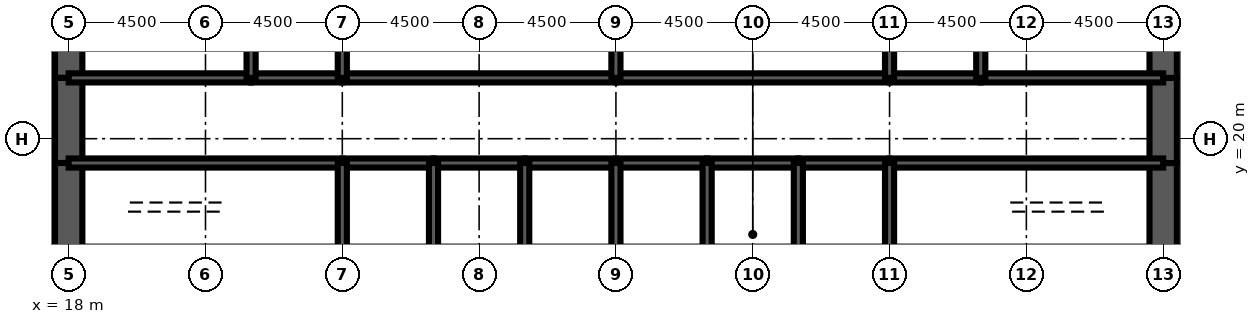
"""IFC4 building model, lengths in metres.
Left out: names, types, materials, properties, quantities, classifications, styles, units other than length and angle.
Written with IfcOpenShell. Run it as: python <this file> out.ifc"""

import sys

from ifc_helpers import new_model, si_unit, direction, frame, frame_2d, origin, place, context, subcontext, project, spatial, rectangle, extrude, element, fill, save


model = new_model("IFC4")
c1 = context("Model", 3, precision=1e-05, world=origin(), true_north=direction((0.0, 1.0)))
c2 = subcontext(c1, "Body", "Model", "MODEL_VIEW")
j1 = project(units=[si_unit("LENGTHUNIT", "METRE"), si_unit("PLANEANGLEUNIT", "RADIAN")], contexts=[c1])
p1 = place(None, origin())
s1 = spatial("IfcSite", under=j1, at=p1, CompositionType="ELEMENT")
p2 = place(p1, origin())
s2 = spatial("IfcBuilding", under=s1, at=p2, CompositionType="ELEMENT")
p3 = place(p2, frame((0.0, 0.0, 159.3)))
s3 = spatial("IfcBuildingStorey", under=s2, at=p3, CompositionType="ELEMENT", Elevation=159.3)
p4 = place(p3, frame((18.0, 26.0, 0.0), z_axis=(0.0, 0.0, 1.0), x_axis=(0.0, -1.0, 0.0)))
e1 = element("IfcWall", 1, at=p4, inside=s3, PredefinedType="SHEAR", context=c2, shape_type="SweptSolid", body=[
    extrude(rectangle(XDim=4.0, YDim=0.9, at=frame_2d((2.0, 0.0))), origin(), (0.0, 0.0, 1.0), 4.2),
])
p5 = place(p3, frame((18.0, 22.0, 0.0), z_axis=(0.0, 0.0, 1.0), x_axis=(0.0, -1.0, 0.0)))
e2 = element("IfcWall", 2, at=p5, inside=s3, PredefinedType="SHEAR", context=c2, shape_type="SweptSolid", body=[
    extrude(rectangle(XDim=2.8, YDim=0.9, at=frame_2d((1.4, 0.0))), origin(), (0.0, 0.0, 1.0), 4.2),
])
p6 = place(p5, frame((0.6, 0.0, 0.0)))
e3 = element("IfcOpeningElement", 3, at=p6, cuts=e2, PredefinedType="OPENING", context=c2, shape_type="SweptSolid", body=[
    extrude(rectangle(XDim=1.8, YDim=2.1, at=frame_2d((0.9, 1.05))), frame((0.0, 0.46, 0.0), z_axis=(0.0, -1.0, 0.0), x_axis=(1.0, 0.0, 0.0)), (0.0, 0.0, 1.0), 0.92),
])
for number, where, z_axis, x_axis in (
    (4, (18.0, 19.2, 0.0), (0.0, 0.0, 1.0), (0.0, -1.0, 0.0)),
    (5, (54.0, 16.0, 0.0), (0.0, 0.0, 1.0), (0.0, 1.0, 0.0)),
):
    element("IfcWall", number, at=place(p3, frame(where, z_axis=z_axis, x_axis=x_axis)), inside=s3, PredefinedType="SHEAR", context=c2, shape_type="SweptSolid", body=[
        extrude(rectangle(XDim=3.2, YDim=0.9, at=frame_2d((1.6, 0.0))), origin(), (0.0, 0.0, 1.0), 4.2),
    ])
p7 = place(p3, frame((54.0, 19.2, 0.0), z_axis=(0.0, 0.0, 1.0), x_axis=(0.0, 1.0, 0.0)))
e6 = element("IfcWall", 6, at=p7, inside=s3, PredefinedType="SHEAR", context=c2, shape_type="SweptSolid", body=[
    extrude(rectangle(XDim=2.8, YDim=0.9, at=frame_2d((1.4, 0.0))), origin(), (0.0, 0.0, 1.0), 4.2),
])
p8 = place(p7, frame((0.4, 0.0, 0.0)))
e7 = element("IfcOpeningElement", 7, at=p8, cuts=e6, PredefinedType="OPENING", context=c2, shape_type="SweptSolid", body=[
    extrude(rectangle(XDim=1.8, YDim=2.1, at=frame_2d((0.9, 1.05))), frame((0.0, 0.46, 0.0), z_axis=(0.0, -1.0, 0.0), x_axis=(1.0, 0.0, 0.0)), (0.0, 0.0, 1.0), 0.92),
])
p9 = place(p3, frame((54.0, 22.0, 0.0), z_axis=(0.0, 0.0, 1.0), x_axis=(0.0, 1.0, 0.0)))
e8 = element("IfcWall", 8, at=p9, inside=s3, PredefinedType="SHEAR", context=c2, shape_type="SweptSolid", body=[
    extrude(rectangle(XDim=4.0, YDim=0.9, at=frame_2d((2.0, 0.0))), origin(), (0.0, 0.0, 1.0), 4.2),
])
p10 = place(p3, frame((18.0, 19.2, 0.0), z_axis=(0.0, 0.0, 1.0), x_axis=(1.0, 0.0, 0.0)))
e9 = element("IfcWall", 9, at=p10, inside=s3, PredefinedType="SOLIDWALL", context=c2, shape_type="SweptSolid", body=[
    extrude(rectangle(XDim=9.0, YDim=0.3, at=frame_2d((4.5, 0.0))), origin(), (0.0, 0.0, 1.0), 4.2),
])
p11 = place(p10, frame((0.65, 0.0, 0.0)))
e10 = element("IfcOpeningElement", 10, at=p11, cuts=e9, PredefinedType="OPENING", context=c2, shape_type="SweptSolid", body=[
    extrude(rectangle(XDim=1.0, YDim=2.1, at=frame_2d((0.5, 1.05))), frame((0.0, 0.16, 0.0), z_axis=(0.0, -1.0, 0.0), x_axis=(1.0, 0.0, 0.0)), (0.0, 0.0, 1.0), 0.32),
])
p12 = place(p3, frame((27.0, 19.2, 0.0), z_axis=(0.0, 0.0, 1.0), x_axis=(1.0, 0.0, 0.0)))
e11 = element("IfcWall", 11, at=p12, inside=s3, PredefinedType="SOLIDWALL", context=c2, shape_type="SweptSolid", body=[
    extrude(rectangle(XDim=3.0, YDim=0.3, at=frame_2d((1.5, 0.0))), origin(), (0.0, 0.0, 1.0), 4.2),
])
p13 = place(p12, frame((0.95, 0.0, 0.0)))
e12 = element("IfcOpeningElement", 12, at=p13, cuts=e11, PredefinedType="OPENING", context=c2, shape_type="SweptSolid", body=[
    extrude(rectangle(XDim=1.1, YDim=2.2, at=frame_2d((0.55, 1.1))), frame((0.0, 0.16, 0.0), z_axis=(0.0, -1.0, 0.0), x_axis=(1.0, 0.0, 0.0)), (0.0, 0.0, 1.0), 0.32),
])
p14 = place(p3, frame((30.0, 19.2, 0.0), z_axis=(0.0, 0.0, 1.0), x_axis=(1.0, 0.0, 0.0)))
e13 = element("IfcWall", 13, at=p14, inside=s3, PredefinedType="SOLIDWALL", context=c2, shape_type="SweptSolid", body=[
    extrude(rectangle(XDim=3.0, YDim=0.3, at=frame_2d((1.5, 0.0))), origin(), (0.0, 0.0, 1.0), 4.2),
])
p15 = place(p14, frame((0.95, 0.0, 0.0)))
e14 = element("IfcOpeningElement", 14, at=p15, cuts=e13, PredefinedType="OPENING", context=c2, shape_type="SweptSolid", body=[
    extrude(rectangle(XDim=1.1, YDim=2.2, at=frame_2d((0.55, 1.1))), frame((0.0, 0.16, 0.0), z_axis=(0.0, -1.0, 0.0), x_axis=(1.0, 0.0, 0.0)), (0.0, 0.0, 1.0), 0.32),
])
p16 = place(p3, frame((33.0, 19.2, 0.0), z_axis=(0.0, 0.0, 1.0), x_axis=(1.0, 0.0, 0.0)))
e15 = element("IfcWall", 15, at=p16, inside=s3, PredefinedType="SOLIDWALL", context=c2, shape_type="SweptSolid", body=[
    extrude(rectangle(XDim=3.0, YDim=0.3, at=frame_2d((1.5, 0.0))), origin(), (0.0, 0.0, 1.0), 4.2),
])
p17 = place(p16, frame((0.95, 0.0, 0.0)))
e16 = element("IfcOpeningElement", 16, at=p17, cuts=e15, PredefinedType="OPENING", context=c2, shape_type="SweptSolid", body=[
    extrude(rectangle(XDim=1.1, YDim=2.2, at=frame_2d((0.55, 1.1))), frame((0.0, 0.16, 0.0), z_axis=(0.0, -1.0, 0.0), x_axis=(1.0, 0.0, 0.0)), (0.0, 0.0, 1.0), 0.32),
])
p18 = place(p3, frame((36.0, 19.2, 0.0), z_axis=(0.0, 0.0, 1.0), x_axis=(1.0, 0.0, 0.0)))
e17 = element("IfcWall", 17, at=p18, inside=s3, PredefinedType="SOLIDWALL", context=c2, shape_type="SweptSolid", body=[
    extrude(rectangle(XDim=3.0, YDim=0.3, at=frame_2d((1.5, 0.0))), origin(), (0.0, 0.0, 1.0), 4.2),
])
p19 = place(p18, frame((0.95, 0.0, 0.0)))
e18 = element("IfcOpeningElement", 18, at=p19, cuts=e17, PredefinedType="OPENING", context=c2, shape_type="SweptSolid", body=[
    extrude(rectangle(XDim=1.1, YDim=2.2, at=frame_2d((0.55, 1.1))), frame((0.0, 0.16, 0.0), z_axis=(0.0, -1.0, 0.0), x_axis=(1.0, 0.0, 0.0)), (0.0, 0.0, 1.0), 0.32),
])
p20 = place(p3, frame((39.0, 19.2, 0.0), z_axis=(0.0, 0.0, 1.0), x_axis=(1.0, 0.0, 0.0)))
e19 = element("IfcWall", 19, at=p20, inside=s3, PredefinedType="SOLIDWALL", context=c2, shape_type="SweptSolid", body=[
    extrude(rectangle(XDim=3.0, YDim=0.3, at=frame_2d((1.5, 0.0))), origin(), (0.0, 0.0, 1.0), 4.2),
])
p21 = place(p20, frame((1.0, 0.0, 0.0)))
e20 = element("IfcOpeningElement", 20, at=p21, cuts=e19, PredefinedType="OPENING", context=c2, shape_type="SweptSolid", body=[
    extrude(rectangle(XDim=1.0, YDim=2.1, at=frame_2d((0.5, 1.05))), frame((0.0, 0.16, 0.0), z_axis=(0.0, -1.0, 0.0), x_axis=(1.0, 0.0, 0.0)), (0.0, 0.0, 1.0), 0.32),
])
p22 = place(p3, frame((42.0, 19.2, 0.0), z_axis=(0.0, 0.0, 1.0), x_axis=(1.0, 0.0, 0.0)))
e21 = element("IfcWall", 21, at=p22, inside=s3, PredefinedType="SOLIDWALL", context=c2, shape_type="SweptSolid", body=[
    extrude(rectangle(XDim=3.0, YDim=0.3, at=frame_2d((1.5, 0.0))), origin(), (0.0, 0.0, 1.0), 4.2),
])
p23 = place(p3, frame((45.0, 19.2, 0.0), z_axis=(0.0, 0.0, 1.0), x_axis=(1.0, 0.0, 0.0)))
e22 = element("IfcWall", 22, at=p23, inside=s3, PredefinedType="SOLIDWALL", context=c2, shape_type="SweptSolid", body=[
    extrude(rectangle(XDim=9.0, YDim=0.3, at=frame_2d((4.5, 0.0))), origin(), (0.0, 0.0, 1.0), 4.2),
])
p24 = place(p23, frame((7.35, 0.0, 0.0)))
e23 = element("IfcOpeningElement", 23, at=p24, cuts=e22, PredefinedType="OPENING", context=c2, shape_type="SweptSolid", body=[
    extrude(rectangle(XDim=1.0, YDim=2.1, at=frame_2d((0.5, 1.05))), frame((0.0, 0.16, 0.0), z_axis=(0.0, -1.0, 0.0), x_axis=(1.0, 0.0, 0.0)), (0.0, 0.0, 1.0), 0.32),
])
p25 = place(p3, frame((18.0, 22.0, 0.0), z_axis=(0.0, 0.0, 1.0), x_axis=(1.0, 0.0, 0.0)))
e24 = element("IfcWall", 24, at=p25, inside=s3, PredefinedType="SOLIDWALL", context=c2, shape_type="SweptSolid", body=[
    extrude(rectangle(XDim=6.0, YDim=0.3, at=frame_2d((3.0, 0.0))), origin(), (0.0, 0.0, 1.0), 4.2),
])
p26 = place(p25, frame((4.4, 0.0, 0.0)))
e25 = element("IfcOpeningElement", 25, at=p26, cuts=e24, PredefinedType="OPENING", context=c2, shape_type="SweptSolid", body=[
    extrude(rectangle(XDim=1.0, YDim=2.1, at=frame_2d((0.5, 1.05))), frame((0.0, 0.16, 0.0), z_axis=(0.0, -1.0, 0.0), x_axis=(1.0, 0.0, 0.0)), (0.0, 0.0, 1.0), 0.32),
])
p27 = place(p25, frame((0.7, 0.0, 0.0)))
e26 = element("IfcOpeningElement", 26, at=p27, cuts=e24, PredefinedType="OPENING", context=c2, shape_type="SweptSolid", body=[
    extrude(rectangle(XDim=1.0, YDim=2.1, at=frame_2d((0.5, 1.05))), frame((0.0, 0.16, 0.0), z_axis=(0.0, -1.0, 0.0), x_axis=(1.0, 0.0, 0.0)), (0.0, 0.0, 1.0), 0.32),
])
p28 = place(p3, frame((24.0, 22.0, 0.0), z_axis=(0.0, 0.0, 1.0), x_axis=(1.0, 0.0, 0.0)))
e27 = element("IfcWall", 27, at=p28, inside=s3, PredefinedType="SOLIDWALL", context=c2, shape_type="SweptSolid", body=[
    extrude(rectangle(XDim=3.0, YDim=0.3, at=frame_2d((1.5, 0.0))), origin(), (0.0, 0.0, 1.0), 4.2),
])
p29 = place(p28, frame((1.0, 0.0, 0.0)))
e28 = element("IfcOpeningElement", 28, at=p29, cuts=e27, PredefinedType="OPENING", context=c2, shape_type="SweptSolid", body=[
    extrude(rectangle(XDim=1.0, YDim=2.1, at=frame_2d((0.5, 1.05))), frame((0.0, 0.16, 0.0), z_axis=(0.0, -1.0, 0.0), x_axis=(1.0, 0.0, 0.0)), (0.0, 0.0, 1.0), 0.32),
])
p30 = place(p3, frame((27.0, 22.0, 0.0), z_axis=(0.0, 0.0, 1.0), x_axis=(1.0, 0.0, 0.0)))
e29 = element("IfcWall", 29, at=p30, inside=s3, PredefinedType="SOLIDWALL", context=c2, shape_type="SweptSolid", body=[
    extrude(rectangle(XDim=9.0, YDim=0.3, at=frame_2d((4.5, 0.0))), origin(), (0.0, 0.0, 1.0), 4.2),
])
p31 = place(p30, frame((4.0, 0.0, 0.0)))
e30 = element("IfcOpeningElement", 30, at=p31, cuts=e29, PredefinedType="OPENING", context=c2, shape_type="SweptSolid", body=[
    extrude(rectangle(XDim=1.0, YDim=2.1, at=frame_2d((0.5, 1.05))), frame((0.0, 0.16, 0.0), z_axis=(0.0, -1.0, 0.0), x_axis=(1.0, 0.0, 0.0)), (0.0, 0.0, 1.0), 0.32),
])
p32 = place(p3, frame((36.0, 22.0, 0.0), z_axis=(0.0, 0.0, 1.0), x_axis=(1.0, 0.0, 0.0)))
e31 = element("IfcWall", 31, at=p32, inside=s3, PredefinedType="SOLIDWALL", context=c2, shape_type="SweptSolid", body=[
    extrude(rectangle(XDim=9.0, YDim=0.3, at=frame_2d((4.5, 0.0))), origin(), (0.0, 0.0, 1.0), 4.2),
])
p33 = place(p32, frame((4.0, 0.0, 0.0)))
e32 = element("IfcOpeningElement", 32, at=p33, cuts=e31, PredefinedType="OPENING", context=c2, shape_type="SweptSolid", body=[
    extrude(rectangle(XDim=1.0, YDim=2.1, at=frame_2d((0.5, 1.05))), frame((0.0, 0.16, 0.0), z_axis=(0.0, -1.0, 0.0), x_axis=(1.0, 0.0, 0.0)), (0.0, 0.0, 1.0), 0.32),
])
p34 = place(p3, frame((45.0, 22.0, 0.0), z_axis=(0.0, 0.0, 1.0), x_axis=(1.0, 0.0, 0.0)))
e33 = element("IfcWall", 33, at=p34, inside=s3, PredefinedType="SOLIDWALL", context=c2, shape_type="SweptSolid", body=[
    extrude(rectangle(XDim=3.0, YDim=0.3, at=frame_2d((1.5, 0.0))), origin(), (0.0, 0.0, 1.0), 4.2),
])
p35 = place(p34, frame((1.0, 0.0, 0.0)))
e34 = element("IfcOpeningElement", 34, at=p35, cuts=e33, PredefinedType="OPENING", context=c2, shape_type="SweptSolid", body=[
    extrude(rectangle(XDim=1.0, YDim=2.1, at=frame_2d((0.5, 1.05))), frame((0.0, 0.16, 0.0), z_axis=(0.0, -1.0, 0.0), x_axis=(1.0, 0.0, 0.0)), (0.0, 0.0, 1.0), 0.32),
])
p36 = place(p3, frame((48.0, 22.0, 0.0), z_axis=(0.0, 0.0, 1.0), x_axis=(1.0, 0.0, 0.0)))
e35 = element("IfcWall", 35, at=p36, inside=s3, PredefinedType="SOLIDWALL", context=c2, shape_type="SweptSolid", body=[
    extrude(rectangle(XDim=6.0, YDim=0.3, at=frame_2d((3.0, 0.0))), origin(), (0.0, 0.0, 1.0), 4.2),
])
p37 = place(p36, frame((2.0, 0.0, 0.0)))
e36 = element("IfcOpeningElement", 36, at=p37, cuts=e35, PredefinedType="OPENING", context=c2, shape_type="SweptSolid", body=[
    extrude(rectangle(XDim=1.0, YDim=2.1, at=frame_2d((0.5, 1.05))), frame((0.0, 0.16, 0.0), z_axis=(0.0, -1.0, 0.0), x_axis=(1.0, 0.0, 0.0)), (0.0, 0.0, 1.0), 0.32),
])
p38 = place(p36, frame((4.0, 0.0, 0.0)))
e37 = element("IfcOpeningElement", 37, at=p38, cuts=e35, PredefinedType="OPENING", context=c2, shape_type="SweptSolid", body=[
    extrude(rectangle(XDim=1.0, YDim=2.1, at=frame_2d((0.5, 1.05))), frame((0.0, 0.16, 0.0), z_axis=(0.0, -1.0, 0.0), x_axis=(1.0, 0.0, 0.0)), (0.0, 0.0, 1.0), 0.32),
])
for number, where, z_axis, x_axis in (
    (38, (27.0, 16.0, 0.0), (0.0, 0.0, 1.0), (0.0, 1.0, 0.0)),
    (39, (30.0, 16.0, 0.0), (0.0, 0.0, 1.0), (0.0, 1.0, 0.0)),
    (40, (33.0, 16.0, 0.0), (0.0, 0.0, 1.0), (0.0, 1.0, 0.0)),
    (41, (36.0, 16.0, 0.0), (0.0, 0.0, 1.0), (0.0, 1.0, 0.0)),
    (42, (39.0, 16.0, 0.0), (0.0, 0.0, 1.0), (0.0, 1.0, 0.0)),
    (43, (42.0, 16.0, 0.0), (0.0, 0.0, 1.0), (0.0, 1.0, 0.0)),
    (44, (45.0, 16.0, 0.0), (0.0, 0.0, 1.0), (0.0, 1.0, 0.0)),
):
    element("IfcWall", number, at=place(p3, frame(where, z_axis=z_axis, x_axis=x_axis)), inside=s3, PredefinedType="SOLIDWALL", context=c2, shape_type="SweptSolid", body=[
        extrude(rectangle(XDim=3.2, YDim=0.3, at=frame_2d((1.6, 0.0))), origin(), (0.0, 0.0, 1.0), 4.2),
    ])
for number, where, z_axis, x_axis in (
    (45, (24.0, 22.0, 0.0), (0.0, 0.0, 1.0), (0.0, 1.0, 0.0)),
    (46, (27.0, 22.0, 0.0), (0.0, 0.0, 1.0), (0.0, 1.0, 0.0)),
    (47, (36.0, 22.0, 0.0), (0.0, 0.0, 1.0), (0.0, 1.0, 0.0)),
    (48, (45.0, 22.0, 0.0), (0.0, 0.0, 1.0), (0.0, 1.0, 0.0)),
    (49, (48.0, 22.0, 0.0), (0.0, 0.0, 1.0), (0.0, 1.0, 0.0)),
):
    element("IfcWall", number, at=place(p3, frame(where, z_axis=z_axis, x_axis=x_axis)), inside=s3, PredefinedType="SOLIDWALL", context=c2, shape_type="SweptSolid", body=[
        extrude(rectangle(XDim=4.0, YDim=0.3, at=frame_2d((2.0, 0.0))), origin(), (0.0, 0.0, 1.0), 4.2),
    ])
p39 = place(p3, frame((39.15, 17.4, 0.0), z_axis=(0.0, 0.0, 1.0), x_axis=(1.0, 0.0, 0.0)))
e50 = element("IfcWall", 50, at=p39, inside=s3, PredefinedType="SOLIDWALL", context=c2, shape_type="SweptSolid", body=[
    extrude(rectangle(XDim=2.7, YDim=0.3, at=frame_2d((1.35, 0.0))), origin(), (0.0, 0.0, 1.0), 4.04),
])
p40 = place(p39, frame((0.85, 0.0, 0.0)))
e51 = element("IfcOpeningElement", 51, at=p40, cuts=e50, PredefinedType="OPENING", context=c2, shape_type="SweptSolid", body=[
    extrude(rectangle(XDim=1.0, YDim=2.1, at=frame_2d((0.5, 1.05))), frame((0.0, 0.16, 0.0), z_axis=(0.0, -1.0, 0.0), x_axis=(1.0, 0.0, 0.0)), (0.0, 0.0, 1.0), 0.32),
])
for number, where, z_axis, x_axis in (
    (52, (20.025, 22.15, 0.0), (0.0, 0.0, 1.0), (0.0, 1.0, 0.0)),
    (53, (51.375, 22.15, 0.0), (0.0, 0.0, 1.0), (0.0, 1.0, 0.0)),
):
    element("IfcWall", number, at=place(p3, frame(where, z_axis=z_axis, x_axis=x_axis)), inside=s3, PredefinedType="PARTITIONING", context=c2, shape_type="SweptSolid", body=[
        extrude(rectangle(XDim=3.7, YDim=0.15, at=frame_2d((1.85, 0.0))), origin(), (0.0, 0.0, 1.0), 3.0),
    ])
p41 = place(p40, origin())
e54 = element("IfcDoor", 54, at=p41, inside=s3, OperationType="SINGLE_SWING_LEFT", PredefinedType="DOOR", context=c2, shape_type="SweptSolid", body=[
    extrude(rectangle(XDim=1.0, YDim=2.1, at=frame_2d((0.5, 1.05))), frame((0.0, 0.025, 0.0), z_axis=(0.0, -1.0, 0.0), x_axis=(1.0, 0.0, 0.0)), (0.0, 0.0, 1.0), 0.05),
])
fill(e51, e54)
p42 = place(p13, origin())
e55 = element("IfcDoor", 55, at=p42, inside=s3, OperationType="DOUBLE_DOOR_SLIDING", PredefinedType="USERDEFINED", context=c2, shape_type="SweptSolid", body=[
    extrude(rectangle(XDim=1.1, YDim=2.2, at=frame_2d((0.55, 1.1))), frame((0.0, 0.025, 0.0), z_axis=(0.0, -1.0, 0.0), x_axis=(1.0, 0.0, 0.0)), (0.0, 0.0, 1.0), 0.05),
])
fill(e12, e55)
p43 = place(p15, origin())
e56 = element("IfcDoor", 56, at=p43, inside=s3, OperationType="DOUBLE_DOOR_SLIDING", PredefinedType="USERDEFINED", context=c2, shape_type="SweptSolid", body=[
    extrude(rectangle(XDim=1.1, YDim=2.2, at=frame_2d((0.55, 1.1))), frame((0.0, 0.025, 0.0), z_axis=(0.0, -1.0, 0.0), x_axis=(1.0, 0.0, 0.0)), (0.0, 0.0, 1.0), 0.05),
])
fill(e14, e56)
p44 = place(p17, origin())
e57 = element("IfcDoor", 57, at=p44, inside=s3, OperationType="DOUBLE_DOOR_SLIDING", PredefinedType="USERDEFINED", context=c2, shape_type="SweptSolid", body=[
    extrude(rectangle(XDim=1.1, YDim=2.2, at=frame_2d((0.55, 1.1))), frame((0.0, 0.025, 0.0), z_axis=(0.0, -1.0, 0.0), x_axis=(1.0, 0.0, 0.0)), (0.0, 0.0, 1.0), 0.05),
])
fill(e16, e57)
p45 = place(p19, origin())
e58 = element("IfcDoor", 58, at=p45, inside=s3, OperationType="DOUBLE_DOOR_SLIDING", PredefinedType="USERDEFINED", context=c2, shape_type="SweptSolid", body=[
    extrude(rectangle(XDim=1.1, YDim=2.2, at=frame_2d((0.55, 1.1))), frame((0.0, 0.025, 0.0), z_axis=(0.0, -1.0, 0.0), x_axis=(1.0, 0.0, 0.0)), (0.0, 0.0, 1.0), 0.05),
])
fill(e18, e58)
p46 = place(p11, origin())
e59 = element("IfcDoor", 59, at=p46, inside=s3, OperationType="SINGLE_SWING_LEFT", PredefinedType="DOOR", context=c2, shape_type="SweptSolid", body=[
    extrude(rectangle(XDim=1.0, YDim=2.1, at=frame_2d((0.5, 1.05))), frame((0.0, 0.025, 0.0), z_axis=(0.0, -1.0, 0.0), x_axis=(1.0, 0.0, 0.0)), (0.0, 0.0, 1.0), 0.05),
])
fill(e10, e59)
p47 = place(p24, origin())
e60 = element("IfcDoor", 60, at=p47, inside=s3, OperationType="SINGLE_SWING_RIGHT", PredefinedType="DOOR", context=c2, shape_type="SweptSolid", body=[
    extrude(rectangle(XDim=1.0, YDim=2.1, at=frame_2d((0.5, 1.05))), frame((0.0, 0.025, 0.0), z_axis=(0.0, -1.0, 0.0), x_axis=(1.0, 0.0, 0.0)), (0.0, 0.0, 1.0), 0.05),
])
fill(e23, e60)
p48 = place(p6, origin())
e61 = element("IfcDoor", 61, at=p48, inside=s3, OperationType="SINGLE_SWING_LEFT", PredefinedType="DOOR", context=c2, shape_type="SweptSolid", body=[
    extrude(rectangle(XDim=1.8, YDim=2.1, at=frame_2d((0.9, 1.05))), frame((0.0, 0.45, 0.0), z_axis=(0.0, -1.0, 0.0), x_axis=(1.0, 0.0, 0.0)), (0.0, 0.0, 1.0), 0.899),
])
fill(e3, e61)
p49 = place(p8, origin())
e62 = element("IfcDoor", 62, at=p49, inside=s3, OperationType="SINGLE_SWING_LEFT", PredefinedType="DOOR", context=c2, shape_type="SweptSolid", body=[
    extrude(rectangle(XDim=1.8, YDim=2.1, at=frame_2d((0.9, 1.05))), frame((0.0, 0.45, 0.0), z_axis=(0.0, -1.0, 0.0), x_axis=(1.0, 0.0, 0.0)), (0.0, 0.0, 1.0), 0.899),
])
fill(e7, e62)
p50 = place(p26, origin())
e63 = element("IfcDoor", 63, at=p50, inside=s3, OperationType="SINGLE_SWING_RIGHT", PredefinedType="DOOR", context=c2, shape_type="SweptSolid", body=[
    extrude(rectangle(XDim=1.0, YDim=2.1, at=frame_2d((0.5, 1.05))), frame((0.0, 0.025, 0.0), z_axis=(0.0, -1.0, 0.0), x_axis=(1.0, 0.0, 0.0)), (0.0, 0.0, 1.0), 0.05),
])
fill(e25, e63)
p51 = place(p29, origin())
e64 = element("IfcDoor", 64, at=p51, inside=s3, OperationType="SINGLE_SWING_LEFT", PredefinedType="DOOR", context=c2, shape_type="SweptSolid", body=[
    extrude(rectangle(XDim=1.0, YDim=2.1, at=frame_2d((0.5, 1.05))), frame((0.0, 0.025, 0.0), z_axis=(0.0, -1.0, 0.0), x_axis=(1.0, 0.0, 0.0)), (0.0, 0.0, 1.0), 0.05),
])
fill(e28, e64)
p52 = place(p31, origin())
e65 = element("IfcDoor", 65, at=p52, inside=s3, OperationType="SINGLE_SWING_LEFT", PredefinedType="DOOR", context=c2, shape_type="SweptSolid", body=[
    extrude(rectangle(XDim=1.0, YDim=2.1, at=frame_2d((0.5, 1.05))), frame((0.0, 0.025, 0.0), z_axis=(0.0, -1.0, 0.0), x_axis=(1.0, 0.0, 0.0)), (0.0, 0.0, 1.0), 0.05),
])
fill(e30, e65)
p53 = place(p33, origin())
e66 = element("IfcDoor", 66, at=p53, inside=s3, OperationType="SINGLE_SWING_LEFT", PredefinedType="DOOR", context=c2, shape_type="SweptSolid", body=[
    extrude(rectangle(XDim=1.0, YDim=2.1, at=frame_2d((0.5, 1.05))), frame((0.0, 0.025, 0.0), z_axis=(0.0, -1.0, 0.0), x_axis=(1.0, 0.0, 0.0)), (0.0, 0.0, 1.0), 0.05),
])
fill(e32, e66)
p54 = place(p35, origin())
e67 = element("IfcDoor", 67, at=p54, inside=s3, OperationType="SINGLE_SWING_LEFT", PredefinedType="DOOR", context=c2, shape_type="SweptSolid", body=[
    extrude(rectangle(XDim=1.0, YDim=2.1, at=frame_2d((0.5, 1.05))), frame((0.0, 0.025, 0.0), z_axis=(0.0, -1.0, 0.0), x_axis=(1.0, 0.0, 0.0)), (0.0, 0.0, 1.0), 0.05),
])
fill(e34, e67)
p55 = place(p37, origin())
e68 = element("IfcDoor", 68, at=p55, inside=s3, OperationType="SINGLE_SWING_LEFT", PredefinedType="DOOR", context=c2, shape_type="SweptSolid", body=[
    extrude(rectangle(XDim=1.0, YDim=2.1, at=frame_2d((0.5, 1.05))), frame((0.0, 0.025, 0.0), z_axis=(0.0, -1.0, 0.0), x_axis=(1.0, 0.0, 0.0)), (0.0, 0.0, 1.0), 0.05),
])
fill(e36, e68)
p56 = place(p27, origin())
e69 = element("IfcDoor", 69, at=p56, inside=s3, OperationType="SINGLE_SWING_LEFT", PredefinedType="DOOR", context=c2, shape_type="SweptSolid", body=[
    extrude(rectangle(XDim=1.0, YDim=2.1, at=frame_2d((0.5, 1.05))), frame((0.0, 0.025, 0.0), z_axis=(0.0, -1.0, 0.0), x_axis=(1.0, 0.0, 0.0)), (0.0, 0.0, 1.0), 0.05),
])
fill(e26, e69)
p57 = place(p38, origin())
e70 = element("IfcDoor", 70, at=p57, inside=s3, OperationType="SINGLE_SWING_RIGHT", PredefinedType="DOOR", context=c2, shape_type="SweptSolid", body=[
    extrude(rectangle(XDim=1.0, YDim=2.1, at=frame_2d((0.5, 1.05))), frame((0.0, 0.025, 0.0), z_axis=(0.0, -1.0, 0.0), x_axis=(1.0, 0.0, 0.0)), (0.0, 0.0, 1.0), 0.05),
])
fill(e37, e70)
p58 = place(p21, origin())
e71 = element("IfcDoor", 71, at=p58, inside=s3, OperationType="SINGLE_SWING_LEFT", PredefinedType="DOOR", context=c2, shape_type="SweptSolid", body=[
    extrude(rectangle(XDim=1.0, YDim=2.1, at=frame_2d((0.5, 1.05))), frame((0.0, 0.025, 0.0), z_axis=(0.0, -1.0, 0.0), x_axis=(1.0, 0.0, 0.0)), (0.0, 0.0, 1.0), 0.05),
])
fill(e20, e71)
save(model, sys.argv[1])
